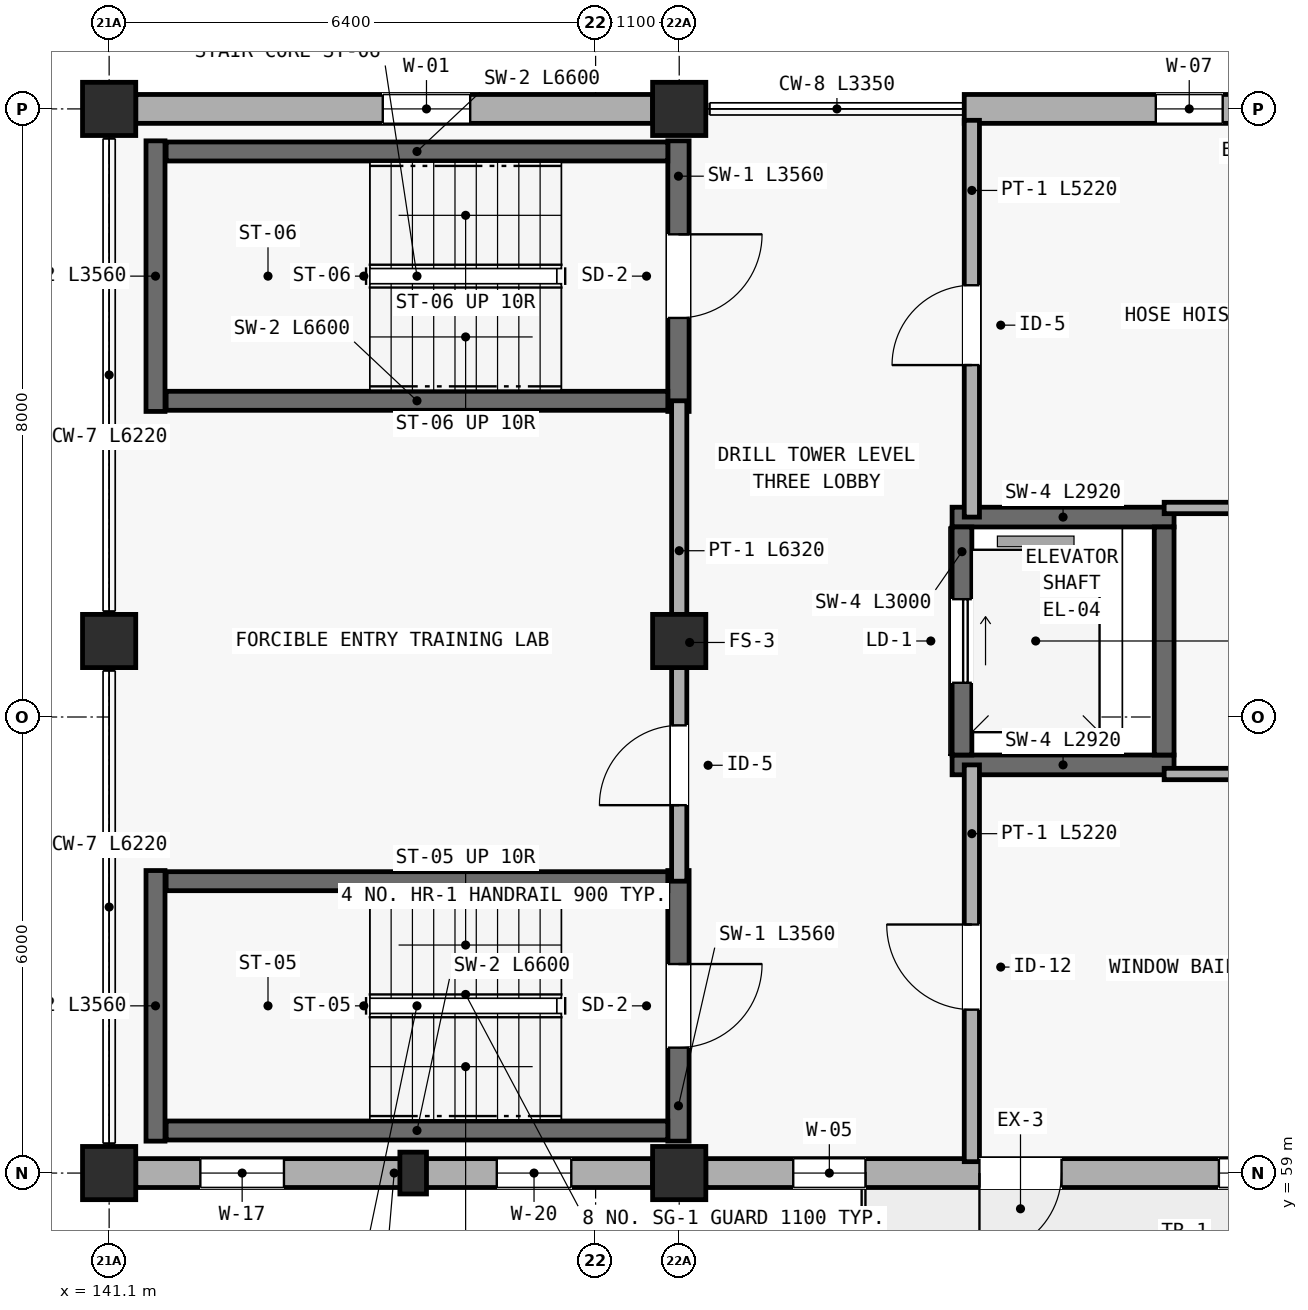
"""IFC4 building model, lengths in metres.
Left out: names, types, materials, properties, quantities, classifications, styles, units other than length and angle.
Written with IfcOpenShell. Run it as: python <this file> out.ifc"""

import sys

from ifc_helpers import new_model, si_unit, direction, frame, frame_2d, origin, origin_2d, place, context, subcontext, project, spatial, rectangle, extrude, element, fill, save


model = new_model("IFC4")
c1 = context("Model", 3, precision=1e-05, world=origin(), true_north=direction((0.0, 1.0)))
c2 = subcontext(c1, "Body", "Model", "MODEL_VIEW")
j1 = project(units=[si_unit("LENGTHUNIT", "METRE"), si_unit("PLANEANGLEUNIT", "RADIAN")], contexts=[c1])
p1 = place(None, origin())
s1 = spatial("IfcSite", under=j1, at=p1, CompositionType="ELEMENT")
p2 = place(p1, origin())
s2 = spatial("IfcBuilding", under=s1, at=p2, CompositionType="ELEMENT")
p3 = place(p2, frame((0.0, 0.0, 9.3)))
s3 = spatial("IfcBuildingStorey", under=s2, at=p3, CompositionType="ELEMENT", Elevation=9.3)
for number, where, z_axis, x_axis in (
    (1, (141.1, 59.0, 0.0), (0.0, 0.0, 1.0), (1.0, 0.0, 0.0)),
    (2, (141.1, 66.0, 0.0), (0.0, 0.0, 1.0), (1.0, 0.0, 0.0)),
    (3, (141.1, 73.0, 0.0), (0.0, 0.0, 1.0), (1.0, 0.0, 0.0)),
    (4, (148.6, 59.0, 0.0), (0.0, 0.0, 1.0), (1.0, 0.0, 0.0)),
    (5, (148.6, 66.0, 0.0), (0.0, 0.0, 1.0), (1.0, 0.0, 0.0)),
    (6, (148.6, 73.0, 0.0), (0.0, 0.0, 1.0), (1.0, 0.0, 0.0)),
):
    element("IfcColumn", number, at=place(p3, frame(where, z_axis=z_axis, x_axis=x_axis)), inside=s3, PredefinedType="COLUMN", context=c2, shape_type="SweptSolid", body=[
        extrude(rectangle(XDim=0.7, YDim=0.7, at=origin_2d()), origin(), (0.0, 0.0, 1.0), 3.45),
    ])
p4 = place(p3, frame((145.1, 59.0, 0.0), z_axis=(0.0, 0.0, 1.0), x_axis=(1.0, 0.0, 0.0)))
e7 = element("IfcColumn", 7, at=p4, inside=s3, PredefinedType="PILASTER", context=c2, shape_type="SweptSolid", body=[
    extrude(rectangle(XDim=0.35, YDim=0.55, at=origin_2d()), origin(), (0.0, 0.0, 1.0), 3.45),
])
p5 = place(p3, frame((141.45, 59.0, 0.0), z_axis=(0.0, 0.0, 1.0), x_axis=(1.0, 0.0, 0.0)))
e8 = element("IfcWall", 8, at=p5, inside=s3, PredefinedType="STANDARD", context=c2, shape_type="SweptSolid", body=[
    extrude(rectangle(XDim=6.8, YDim=0.38, at=frame_2d((3.4, 0.0))), origin(), (0.0, 0.0, 1.0), 2.75),
])
p6 = place(p5, frame((0.85, 0.0, 0.75)))
e9 = element("IfcOpeningElement", 9, at=p6, cuts=e8, PredefinedType="OPENING", context=c2, shape_type="SweptSolid", body=[
    extrude(rectangle(XDim=1.1, YDim=1.35, at=frame_2d((0.55, 0.675))), frame((0.0, 0.2, 0.0), z_axis=(0.0, -1.0, 0.0), x_axis=(1.0, 0.0, 0.0)), (0.0, 0.0, 1.0), 0.4),
])
p7 = place(p5, frame((4.75, 0.0, 0.75)))
e10 = element("IfcOpeningElement", 10, at=p7, cuts=e8, PredefinedType="OPENING", context=c2, shape_type="SweptSolid", body=[
    extrude(rectangle(XDim=0.98, YDim=1.45, at=frame_2d((0.49, 0.725))), frame((0.0, 0.2, 0.0), z_axis=(0.0, -1.0, 0.0), x_axis=(1.0, 0.0, 0.0)), (0.0, 0.0, 1.0), 0.4),
])
p8 = place(p3, frame((148.95, 59.0, 0.0), z_axis=(0.0, 0.0, 1.0), x_axis=(1.0, 0.0, 0.0)))
e11 = element("IfcWall", 11, at=p8, inside=s3, PredefinedType="STANDARD", context=c2, shape_type="SweptSolid", body=[
    extrude(rectangle(XDim=11.7, YDim=0.38, at=frame_2d((5.85, 0.0))), origin(), (0.0, 0.0, 1.0), 2.75),
])
p9 = place(p8, frame((3.6, 0.0, 0.0)))
e12 = element("IfcOpeningElement", 12, at=p9, cuts=e11, PredefinedType="OPENING", context=c2, shape_type="SweptSolid", body=[
    extrude(rectangle(XDim=1.08, YDim=2.1, at=frame_2d((0.54, 1.05))), frame((0.0, 0.2, 0.0), z_axis=(0.0, -1.0, 0.0), x_axis=(1.0, 0.0, 0.0)), (0.0, 0.0, 1.0), 0.4),
])
p10 = place(p8, frame((1.15, 0.0, 0.75)))
e13 = element("IfcOpeningElement", 13, at=p10, cuts=e11, PredefinedType="OPENING", context=c2, shape_type="SweptSolid", body=[
    extrude(rectangle(XDim=0.95, YDim=1.35, at=frame_2d((0.475, 0.675))), frame((0.0, 0.2, 0.0), z_axis=(0.0, -1.0, 0.0), x_axis=(1.0, 0.0, 0.0)), (0.0, 0.0, 1.0), 0.4),
])
p11 = place(p8, frame((6.75, 0.0, 0.75)))
e14 = element("IfcOpeningElement", 14, at=p11, cuts=e11, PredefinedType="OPENING", context=c2, shape_type="SweptSolid", body=[
    extrude(rectangle(XDim=0.95, YDim=1.35, at=frame_2d((0.475, 0.675))), frame((0.0, 0.2, 0.0), z_axis=(0.0, -1.0, 0.0), x_axis=(1.0, 0.0, 0.0)), (0.0, 0.0, 1.0), 0.4),
])
p12 = place(p3, frame((160.65, 73.0, 0.0), z_axis=(0.0, 0.0, 1.0), x_axis=(-1.0, 0.0, 0.0)))
e15 = element("IfcWall", 15, at=p12, inside=s3, PredefinedType="STANDARD", context=c2, shape_type="SweptSolid", body=[
    extrude(rectangle(XDim=8.3, YDim=0.38, at=frame_2d((4.15, 0.0))), origin(), (0.0, 0.0, 1.0), 2.75),
])
p13 = place(p12, frame((1.3, 0.0, 0.75)))
e16 = element("IfcOpeningElement", 16, at=p13, cuts=e15, PredefinedType="OPENING", context=c2, shape_type="SweptSolid", body=[
    extrude(rectangle(XDim=0.88, YDim=1.5, at=frame_2d((0.44, 0.75))), frame((0.0, 0.2, 0.0), z_axis=(0.0, -1.0, 0.0), x_axis=(1.0, 0.0, 0.0)), (0.0, 0.0, 1.0), 0.4),
])
p14 = place(p12, frame((4.9, 0.0, 0.75)))
e17 = element("IfcOpeningElement", 17, at=p14, cuts=e15, PredefinedType="OPENING", context=c2, shape_type="SweptSolid", body=[
    extrude(rectangle(XDim=0.88, YDim=1.5, at=frame_2d((0.44, 0.75))), frame((0.0, 0.2, 0.0), z_axis=(0.0, -1.0, 0.0), x_axis=(1.0, 0.0, 0.0)), (0.0, 0.0, 1.0), 0.4),
])
p15 = place(p3, frame((148.25, 73.0, 0.0), z_axis=(0.0, 0.0, 1.0), x_axis=(-1.0, 0.0, 0.0)))
e18 = element("IfcWall", 18, at=p15, inside=s3, PredefinedType="STANDARD", context=c2, shape_type="SweptSolid", body=[
    extrude(rectangle(XDim=6.8, YDim=0.38, at=frame_2d((3.4, 0.0))), origin(), (0.0, 0.0, 1.0), 2.75),
])
p16 = place(p15, frame((2.4, 0.0, 0.75)))
e19 = element("IfcOpeningElement", 19, at=p16, cuts=e18, PredefinedType="OPENING", context=c2, shape_type="SweptSolid", body=[
    extrude(rectangle(XDim=1.15, YDim=1.45, at=frame_2d((0.575, 0.725))), frame((0.0, 0.2, 0.0), z_axis=(0.0, -1.0, 0.0), x_axis=(1.0, 0.0, 0.0)), (0.0, 0.0, 1.0), 0.4),
])
p17 = place(p3, frame((148.59, 62.98, 0.0), z_axis=(0.0, 0.0, 1.0), x_axis=(0.0, -1.0, 0.0)))
e20 = element("IfcWall", 20, at=p17, inside=s3, PredefinedType="SHEAR", context=c2, shape_type="SweptSolid", body=[
    extrude(rectangle(XDim=3.56, YDim=0.28, at=frame_2d((1.78, 0.0))), origin(), (0.0, 0.0, 1.0), 3.2),
])
p18 = place(p17, frame((1.23, 0.0, 0.0)))
e21 = element("IfcOpeningElement", 21, at=p18, cuts=e20, PredefinedType="OPENING", context=c2, shape_type="SweptSolid", body=[
    extrude(rectangle(XDim=1.1, YDim=2.15, at=frame_2d((0.55, 1.075))), frame((0.0, 0.15, 0.0), z_axis=(0.0, -1.0, 0.0), x_axis=(1.0, 0.0, 0.0)), (0.0, 0.0, 1.0), 0.3),
])
p19 = place(p3, frame((141.71, 59.42, 0.0), z_axis=(0.0, 0.0, 1.0), x_axis=(0.0, 1.0, 0.0)))
e22 = element("IfcWall", 22, at=p19, inside=s3, PredefinedType="SHEAR", context=c2, shape_type="SweptSolid", body=[
    extrude(rectangle(XDim=3.56, YDim=0.25, at=frame_2d((1.78, 0.0))), origin(), (0.0, 0.0, 1.0), 3.2),
])
for number, where, z_axis, x_axis in (
    (23, (148.45, 62.84, 0.0), (0.0, 0.0, 1.0), (-1.0, 0.0, 0.0)),
    (24, (141.85, 59.56, 0.0), (0.0, 0.0, 1.0), (1.0, 0.0, 0.0)),
):
    element("IfcWall", number, at=place(p3, frame(where, z_axis=z_axis, x_axis=x_axis)), inside=s3, PredefinedType="SHEAR", context=c2, shape_type="SweptSolid", body=[
        extrude(rectangle(XDim=6.6, YDim=0.25, at=frame_2d((3.3, 0.0))), origin(), (0.0, 0.0, 1.0), 3.2),
    ])
p20 = place(p3, frame((148.59, 72.58, 0.0), z_axis=(0.0, 0.0, 1.0), x_axis=(0.0, -1.0, 0.0)))
e25 = element("IfcWall", 25, at=p20, inside=s3, PredefinedType="SHEAR", context=c2, shape_type="SweptSolid", body=[
    extrude(rectangle(XDim=3.56, YDim=0.28, at=frame_2d((1.78, 0.0))), origin(), (0.0, 0.0, 1.0), 3.2),
])
p21 = place(p20, frame((1.23, 0.0, 0.0)))
e26 = element("IfcOpeningElement", 26, at=p21, cuts=e25, PredefinedType="OPENING", context=c2, shape_type="SweptSolid", body=[
    extrude(rectangle(XDim=1.1, YDim=2.15, at=frame_2d((0.55, 1.075))), frame((0.0, 0.15, 0.0), z_axis=(0.0, -1.0, 0.0), x_axis=(1.0, 0.0, 0.0)), (0.0, 0.0, 1.0), 0.3),
])
p22 = place(p3, frame((141.71, 69.02, 0.0), z_axis=(0.0, 0.0, 1.0), x_axis=(0.0, 1.0, 0.0)))
e27 = element("IfcWall", 27, at=p22, inside=s3, PredefinedType="SHEAR", context=c2, shape_type="SweptSolid", body=[
    extrude(rectangle(XDim=3.56, YDim=0.25, at=frame_2d((1.78, 0.0))), origin(), (0.0, 0.0, 1.0), 3.2),
])
for number, where, z_axis, x_axis in (
    (28, (148.45, 72.44, 0.0), (0.0, 0.0, 1.0), (-1.0, 0.0, 0.0)),
    (29, (141.85, 69.16, 0.0), (0.0, 0.0, 1.0), (1.0, 0.0, 0.0)),
):
    element("IfcWall", number, at=place(p3, frame(where, z_axis=z_axis, x_axis=x_axis)), inside=s3, PredefinedType="SHEAR", context=c2, shape_type="SweptSolid", body=[
        extrude(rectangle(XDim=6.6, YDim=0.25, at=frame_2d((3.3, 0.0))), origin(), (0.0, 0.0, 1.0), 3.2),
    ])
for number, where, z_axis, x_axis in (
    (30, (152.19, 64.37, 0.0), (0.0, 0.0, 1.0), (1.0, 0.0, 0.0)),
    (31, (155.11, 67.63, 0.0), (0.0, 0.0, 1.0), (-1.0, 0.0, 0.0)),
):
    element("IfcWall", number, at=place(p3, frame(where, z_axis=z_axis, x_axis=x_axis)), inside=s3, PredefinedType="SHEAR", context=c2, shape_type="SweptSolid", body=[
        extrude(rectangle(XDim=2.92, YDim=0.26, at=frame_2d((1.46, 0.0))), origin(), (0.0, 0.0, 1.0), 3.2),
    ])
p23 = place(p3, frame((152.32, 67.5, 0.0), z_axis=(0.0, 0.0, 1.0), x_axis=(0.0, -1.0, 0.0)))
e32 = element("IfcWall", 32, at=p23, inside=s3, PredefinedType="SHEAR", context=c2, shape_type="SweptSolid", body=[
    extrude(rectangle(XDim=3.0, YDim=0.26, at=frame_2d((1.5, 0.0))), origin(), (0.0, 0.0, 1.0), 3.2),
])
p24 = place(p23, frame((0.95, 0.0, 0.0)))
e33 = element("IfcOpeningElement", 33, at=p24, cuts=e32, PredefinedType="OPENING", context=c2, shape_type="SweptSolid", body=[
    extrude(rectangle(XDim=1.1, YDim=2.15, at=frame_2d((0.55, 1.075))), frame((0.0, 0.14, 0.0), z_axis=(0.0, -1.0, 0.0), x_axis=(1.0, 0.0, 0.0)), (0.0, 0.0, 1.0), 0.28),
])
p25 = place(p3, frame((154.98, 64.5, 0.0), z_axis=(0.0, 0.0, 1.0), x_axis=(0.0, 1.0, 0.0)))
e34 = element("IfcWall", 34, at=p25, inside=s3, PredefinedType="SHEAR", context=c2, shape_type="SweptSolid", body=[
    extrude(rectangle(XDim=3.0, YDim=0.26, at=frame_2d((1.5, 0.0))), origin(), (0.0, 0.0, 1.0), 3.2),
])
p26 = place(p3, frame((148.6, 62.84, 0.0), z_axis=(0.0, 0.0, 1.0), x_axis=(0.0, 1.0, 0.0)))
e35 = element("IfcWall", 35, at=p26, inside=s3, PredefinedType="PARTITIONING", context=c2, shape_type="SweptSolid", body=[
    extrude(rectangle(XDim=6.32, YDim=0.2, at=frame_2d((3.16, 0.0))), origin(), (0.0, 0.0, 1.0), 2.7),
])
p27 = place(p26, frame((1.0, 0.0, 0.0)))
e36 = element("IfcOpeningElement", 36, at=p27, cuts=e35, PredefinedType="OPENING", context=c2, shape_type="SweptSolid", body=[
    extrude(rectangle(XDim=1.05, YDim=2.14, at=frame_2d((0.525, 1.07))), frame((0.0, 0.11, 0.0), z_axis=(0.0, -1.0, 0.0), x_axis=(1.0, 0.0, 0.0)), (0.0, 0.0, 1.0), 0.22),
])
p28 = place(p3, frame((152.45, 59.15, 0.0), z_axis=(0.0, 0.0, 1.0), x_axis=(0.0, 1.0, 0.0)))
e37 = element("IfcWall", 37, at=p28, inside=s3, PredefinedType="PARTITIONING", context=c2, shape_type="SweptSolid", body=[
    extrude(rectangle(XDim=5.22, YDim=0.2, at=frame_2d((2.61, 0.0))), origin(), (0.0, 0.0, 1.0), 2.7),
])
p29 = place(p28, frame((2.0, 0.0, 0.0)))
e38 = element("IfcOpeningElement", 38, at=p29, cuts=e37, PredefinedType="OPENING", context=c2, shape_type="SweptSolid", body=[
    extrude(rectangle(XDim=1.12, YDim=2.15, at=frame_2d((0.56, 1.075))), frame((0.0, 0.11, 0.0), z_axis=(0.0, -1.0, 0.0), x_axis=(1.0, 0.0, 0.0)), (0.0, 0.0, 1.0), 0.22),
])
p30 = place(p3, frame((152.45, 67.63, 0.0), z_axis=(0.0, 0.0, 1.0), x_axis=(0.0, 1.0, 0.0)))
e39 = element("IfcWall", 39, at=p30, inside=s3, PredefinedType="PARTITIONING", context=c2, shape_type="SweptSolid", body=[
    extrude(rectangle(XDim=5.22, YDim=0.2, at=frame_2d((2.61, 0.0))), origin(), (0.0, 0.0, 1.0), 2.7),
])
p31 = place(p30, frame((2.0, 0.0, 0.0)))
e40 = element("IfcOpeningElement", 40, at=p31, cuts=e39, PredefinedType="OPENING", context=c2, shape_type="SweptSolid", body=[
    extrude(rectangle(XDim=1.05, YDim=2.14, at=frame_2d((0.525, 1.07))), frame((0.0, 0.11, 0.0), z_axis=(0.0, -1.0, 0.0), x_axis=(1.0, 0.0, 0.0)), (0.0, 0.0, 1.0), 0.22),
])
p32 = place(p3, frame((154.98, 64.25, 0.0), z_axis=(0.0, 0.0, 1.0), x_axis=(1.0, 0.0, 0.0)))
e41 = element("IfcWall", 41, at=p32, inside=s3, PredefinedType="PARTITIONING", context=c2, shape_type="SweptSolid", body=[
    extrude(rectangle(XDim=5.87, YDim=0.15, at=frame_2d((2.935, 0.0))), origin(), (0.0, 0.0, 1.0), 2.7),
])
p33 = place(p3, frame((154.98, 67.75, 0.0), z_axis=(0.0, 0.0, 1.0), x_axis=(1.0, 0.0, 0.0)))
e42 = element("IfcWall", 42, at=p33, inside=s3, PredefinedType="PARTITIONING", context=c2, shape_type="SweptSolid", body=[
    extrude(rectangle(XDim=5.87, YDim=0.15, at=frame_2d((2.935, 0.0))), origin(), (0.0, 0.0, 1.0), 2.7),
])
p34 = place(p33, frame((2.2, 0.0, 0.0)))
e43 = element("IfcOpeningElement", 43, at=p34, cuts=e42, PredefinedType="OPENING", context=c2, shape_type="SweptSolid", body=[
    extrude(rectangle(XDim=0.92, YDim=2.1, at=frame_2d((0.46, 1.05))), frame((0.0, 0.085, 0.0), z_axis=(0.0, -1.0, 0.0), x_axis=(1.0, 0.0, 0.0)), (0.0, 0.0, 1.0), 0.17),
])
p35 = place(p6, origin())
e44 = element("IfcWindow", 44, at=p35, inside=s3, PartitioningType="SINGLE_PANEL", PredefinedType="WINDOW", context=c2, shape_type="SweptSolid", body=[
    extrude(rectangle(XDim=1.1, YDim=1.35, at=frame_2d((0.55, 0.675))), frame((0.0, 0.03, 0.0), z_axis=(0.0, -1.0, 0.0), x_axis=(1.0, 0.0, 0.0)), (0.0, 0.0, 1.0), 0.06),
])
fill(e9, e44)
p36 = place(p7, origin())
e45 = element("IfcWindow", 45, at=p36, inside=s3, PartitioningType="SINGLE_PANEL", PredefinedType="WINDOW", context=c2, shape_type="SweptSolid", body=[
    extrude(rectangle(XDim=0.98, YDim=1.45, at=frame_2d((0.49, 0.725))), frame((0.0, 0.03, 0.0), z_axis=(0.0, -1.0, 0.0), x_axis=(1.0, 0.0, 0.0)), (0.0, 0.0, 1.0), 0.06),
])
fill(e10, e45)
p37 = place(p9, frame((1.08, 0.0, 0.0), z_axis=(0.0, 0.0, 1.0), x_axis=(-1.0, 0.0, 0.0)))
e46 = element("IfcDoor", 46, at=p37, inside=s3, OperationType="SINGLE_SWING_LEFT", PredefinedType="DOOR", context=c2, shape_type="SweptSolid", body=[
    extrude(rectangle(XDim=1.08, YDim=2.1, at=frame_2d((0.54, 1.05))), frame((0.0, 0.025, 0.0), z_axis=(0.0, -1.0, 0.0), x_axis=(1.0, 0.0, 0.0)), (0.0, 0.0, 1.0), 0.05),
])
fill(e12, e46)
p38 = place(p10, origin())
e47 = element("IfcWindow", 47, at=p38, inside=s3, PartitioningType="SINGLE_PANEL", PredefinedType="WINDOW", context=c2, shape_type="SweptSolid", body=[
    extrude(rectangle(XDim=0.95, YDim=1.35, at=frame_2d((0.475, 0.675))), frame((0.0, 0.03, 0.0), z_axis=(0.0, -1.0, 0.0), x_axis=(1.0, 0.0, 0.0)), (0.0, 0.0, 1.0), 0.06),
])
fill(e13, e47)
p39 = place(p11, origin())
e48 = element("IfcWindow", 48, at=p39, inside=s3, PartitioningType="SINGLE_PANEL", PredefinedType="WINDOW", context=c2, shape_type="SweptSolid", body=[
    extrude(rectangle(XDim=0.95, YDim=1.35, at=frame_2d((0.475, 0.675))), frame((0.0, 0.03, 0.0), z_axis=(0.0, -1.0, 0.0), x_axis=(1.0, 0.0, 0.0)), (0.0, 0.0, 1.0), 0.06),
])
fill(e14, e48)
p40 = place(p14, origin())
e49 = element("IfcWindow", 49, at=p40, inside=s3, PartitioningType="SINGLE_PANEL", PredefinedType="WINDOW", context=c2, shape_type="SweptSolid", body=[
    extrude(rectangle(XDim=0.88, YDim=1.5, at=frame_2d((0.44, 0.75))), frame((0.0, 0.03, 0.0), z_axis=(0.0, -1.0, 0.0), x_axis=(1.0, 0.0, 0.0)), (0.0, 0.0, 1.0), 0.06),
])
fill(e17, e49)
p41 = place(p16, origin())
e50 = element("IfcWindow", 50, at=p41, inside=s3, PartitioningType="SINGLE_PANEL", PredefinedType="WINDOW", context=c2, shape_type="SweptSolid", body=[
    extrude(rectangle(XDim=1.15, YDim=1.45, at=frame_2d((0.575, 0.725))), frame((0.0, 0.03, 0.0), z_axis=(0.0, -1.0, 0.0), x_axis=(1.0, 0.0, 0.0)), (0.0, 0.0, 1.0), 0.06),
])
fill(e19, e50)
p42 = place(p18, origin())
e51 = element("IfcDoor", 51, at=p42, inside=s3, OperationType="SINGLE_SWING_LEFT", PredefinedType="DOOR", context=c2, shape_type="SweptSolid", body=[
    extrude(rectangle(XDim=1.1, YDim=2.15, at=frame_2d((0.55, 1.075))), frame((0.0, 0.025, 0.0), z_axis=(0.0, -1.0, 0.0), x_axis=(1.0, 0.0, 0.0)), (0.0, 0.0, 1.0), 0.05),
])
fill(e21, e51)
p43 = place(p21, origin())
e52 = element("IfcDoor", 52, at=p43, inside=s3, OperationType="SINGLE_SWING_LEFT", PredefinedType="DOOR", context=c2, shape_type="SweptSolid", body=[
    extrude(rectangle(XDim=1.1, YDim=2.15, at=frame_2d((0.55, 1.075))), frame((0.0, 0.025, 0.0), z_axis=(0.0, -1.0, 0.0), x_axis=(1.0, 0.0, 0.0)), (0.0, 0.0, 1.0), 0.05),
])
fill(e26, e52)
p44 = place(p24, origin())
e53 = element("IfcDoor", 53, at=p44, inside=s3, OperationType="SLIDING_TO_LEFT", PredefinedType="DOOR", context=c2, shape_type="SweptSolid", body=[
    extrude(rectangle(XDim=1.1, YDim=2.15, at=frame_2d((0.55, 1.075))), frame((0.0, 0.025, 0.0), z_axis=(0.0, -1.0, 0.0), x_axis=(1.0, 0.0, 0.0)), (0.0, 0.0, 1.0), 0.05),
])
fill(e33, e53)
p45 = place(p27, origin())
e54 = element("IfcDoor", 54, at=p45, inside=s3, OperationType="SINGLE_SWING_LEFT", PredefinedType="DOOR", context=c2, shape_type="SweptSolid", body=[
    extrude(rectangle(XDim=1.05, YDim=2.14, at=frame_2d((0.525, 1.07))), frame((0.0, 0.025, 0.0), z_axis=(0.0, -1.0, 0.0), x_axis=(1.0, 0.0, 0.0)), (0.0, 0.0, 1.0), 0.05),
])
fill(e36, e54)
p46 = place(p29, origin())
e55 = element("IfcDoor", 55, at=p46, inside=s3, OperationType="SINGLE_SWING_RIGHT", PredefinedType="DOOR", context=c2, shape_type="SweptSolid", body=[
    extrude(rectangle(XDim=1.12, YDim=2.15, at=frame_2d((0.56, 1.075))), frame((0.0, 0.025, 0.0), z_axis=(0.0, -1.0, 0.0), x_axis=(1.0, 0.0, 0.0)), (0.0, 0.0, 1.0), 0.05),
])
fill(e38, e55)
p47 = place(p31, origin())
e56 = element("IfcDoor", 56, at=p47, inside=s3, OperationType="SINGLE_SWING_LEFT", PredefinedType="DOOR", context=c2, shape_type="SweptSolid", body=[
    extrude(rectangle(XDim=1.05, YDim=2.14, at=frame_2d((0.525, 1.07))), frame((0.0, 0.025, 0.0), z_axis=(0.0, -1.0, 0.0), x_axis=(1.0, 0.0, 0.0)), (0.0, 0.0, 1.0), 0.05),
])
fill(e40, e56)
save(model, sys.argv[1])
